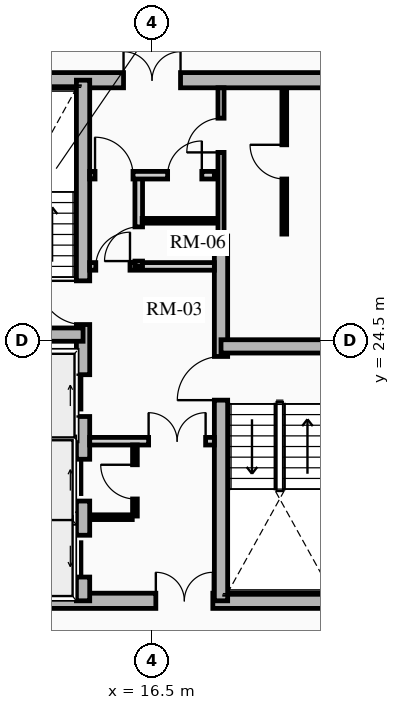
"""IFC4 building model, lengths in metres.
Left out: names, types, materials, properties, quantities, classifications, styles, units other than length and angle.
Written with IfcOpenShell. Run it as: python <this file> out.ifc"""

import sys

from ifc_helpers import new_model, si_unit, direction, frame, frame_2d, origin, place, context, subcontext, project, spatial, rectangle, extrude, source, transform, mapped, element, fill, save


model = new_model("IFC4")
c1 = context("Model", 3, precision=1e-05, world=origin(), true_north=direction((0.0, 1.0)))
c2 = subcontext(c1, "Body", "Model", "MODEL_VIEW")
j1 = project(units=[si_unit("LENGTHUNIT", "METRE"), si_unit("PLANEANGLEUNIT", "RADIAN")], contexts=[c1])
p1 = place(None, origin())
s1 = spatial("IfcSite", under=j1, at=p1, CompositionType="ELEMENT")
p2 = place(p1, origin())
s2 = spatial("IfcBuilding", under=s1, at=p2, CompositionType="ELEMENT")
p3 = place(p2, frame((0.0, 0.0, 151.6)))
s3 = spatial("IfcBuildingStorey", under=s2, at=p3, CompositionType="ELEMENT", Elevation=151.6)
p4 = place(p3, frame((11.15, 17.65, 0.0), z_axis=(0.0, 0.0, 1.0), x_axis=(1.0, 0.0, 0.0)))
e1 = element("IfcWall", 1, at=p4, inside=s3, PredefinedType="SHEAR", context=c2, shape_type="SweptSolid", body=[
    extrude(rectangle(XDim=10.7, YDim=0.4, at=frame_2d((5.35, 0.0))), origin(), (0.0, 0.0, 1.0), 2.91),
])
m1 = source(origin(), c2, "Body", "SweptSolid", [
    extrude(rectangle(XDim=1.5, YDim=2.02, at=frame_2d((0.75, 1.01))), frame((0.0, 0.21, 0.0), z_axis=(0.0, -1.0, 0.0), x_axis=(1.0, 0.0, 0.0)), (0.0, 0.0, 1.0), 0.42),
])
p5 = place(p4, frame((5.45, 0.0, 0.0)))
e2 = element("IfcOpeningElement", 2, at=p5, cuts=e1, PredefinedType="OPENING", context=c2, shape_type="MappedRepresentation", body=[
    mapped(m1, transform((0.0, 0.0, 0.0), x_axis=(1.0, 0.0, 0.0), y_axis=(0.0, 1.0, 0.0), z_axis=(0.0, 0.0, 1.0), scale=1.0)),
])
p6 = place(p3, frame((11.15, 31.35, 0.0), z_axis=(0.0, 0.0, 1.0), x_axis=(1.0, 0.0, 0.0)))
e3 = element("IfcWall", 3, at=p6, inside=s3, PredefinedType="SHEAR", context=c2, shape_type="SweptSolid", body=[
    extrude(rectangle(XDim=10.7, YDim=0.4, at=frame_2d((5.35, 0.0))), origin(), (0.0, 0.0, 1.0), 2.91),
])
p7 = place(p6, frame((4.6, 0.0, 0.0)))
e4 = element("IfcOpeningElement", 4, at=p7, cuts=e3, PredefinedType="OPENING", context=c2, shape_type="MappedRepresentation", body=[
    mapped(m1, transform((0.0, 0.0, 0.0), x_axis=(1.0, 0.0, 0.0), y_axis=(0.0, 1.0, 0.0), z_axis=(0.0, 0.0, 1.0), scale=1.0)),
])
p8 = place(p3, frame((14.685, 17.65, 0.0), z_axis=(0.0, 0.0, 1.0), x_axis=(0.0, 1.0, 0.0)))
e5 = element("IfcWall", 5, at=p8, inside=s3, PredefinedType="SHEAR", context=c2, shape_type="SweptSolid", body=[
    extrude(rectangle(XDim=13.7, YDim=0.35, at=frame_2d((6.85, 0.0))), origin(), (0.0, 0.0, 1.0), 2.91),
])
m2 = source(origin(), c2, "Body", "SweptSolid", [
    extrude(rectangle(XDim=1.1, YDim=2.015, at=frame_2d((0.55, 1.007))), frame((0.0, 0.185, 0.0), z_axis=(0.0, -1.0, 0.0), x_axis=(1.0, 0.0, 0.0)), (0.0, 0.0, 1.0), 0.37),
])
p9 = place(p8, frame((4.85, 0.0, 0.0)))
e6 = element("IfcOpeningElement", 6, at=p9, cuts=e5, PredefinedType="OPENING", context=c2, shape_type="MappedRepresentation", body=[
    mapped(m2, transform((0.0, 0.0, 0.0), x_axis=(1.0, 0.0, 0.0), y_axis=(0.0, 1.0, 0.0), z_axis=(0.0, 0.0, 1.0), scale=1.0)),
])
p10 = place(p8, frame((0.625, 0.0, 0.0)))
e7 = element("IfcOpeningElement", 7, at=p10, cuts=e5, PredefinedType="OPENING", context=c2, shape_type="MappedRepresentation", body=[
    mapped(m2, transform((0.0, 0.0, 0.0), x_axis=(1.0, 0.0, 0.0), y_axis=(0.0, 1.0, 0.0), z_axis=(0.0, 0.0, 1.0), scale=1.0)),
])
p11 = place(p8, frame((2.625, 0.0, 0.0)))
e8 = element("IfcOpeningElement", 8, at=p11, cuts=e5, PredefinedType="OPENING", context=c2, shape_type="MappedRepresentation", body=[
    mapped(m2, transform((0.0, 0.0, 0.0), x_axis=(1.0, 0.0, 0.0), y_axis=(0.0, 1.0, 0.0), z_axis=(0.0, 0.0, 1.0), scale=1.0)),
])
m3 = source(origin(), c2, "Body", "SweptSolid", [
    extrude(rectangle(XDim=1.15, YDim=2.02, at=frame_2d((0.575, 1.01))), frame((0.0, 0.185, 0.0), z_axis=(0.0, -1.0, 0.0), x_axis=(1.0, 0.0, 0.0)), (0.0, 0.0, 1.0), 0.37),
])
p12 = place(p8, frame((7.27, 0.0, 0.0)))
e9 = element("IfcOpeningElement", 9, at=p12, cuts=e5, PredefinedType="OPENING", context=c2, shape_type="MappedRepresentation", body=[
    mapped(m3, transform((0.0, 0.0, 0.0), x_axis=(1.0, 0.0, 0.0), y_axis=(0.0, 1.0, 0.0), z_axis=(0.0, 0.0, 1.0), scale=1.0)),
])
p13 = place(p3, frame((18.315, 17.65, 0.0), z_axis=(0.0, 0.0, 1.0), x_axis=(0.0, 1.0, 0.0)))
e10 = element("IfcWall", 10, at=p13, inside=s3, PredefinedType="SHEAR", context=c2, shape_type="SweptSolid", body=[
    extrude(rectangle(XDim=9.6, YDim=0.35, at=frame_2d((4.8, 0.0))), origin(), (0.0, 0.0, 1.0), 2.91),
])
p14 = place(p13, frame((5.28, 0.0, 0.0)))
e11 = element("IfcOpeningElement", 11, at=p14, cuts=e10, PredefinedType="OPENING", context=c2, shape_type="MappedRepresentation", body=[
    mapped(m3, transform((0.0, 0.0, 0.0), x_axis=(1.0, 0.0, 0.0), y_axis=(0.0, 1.0, 0.0), z_axis=(0.0, 0.0, 1.0), scale=1.0)),
])
for number, where, z_axis, x_axis in (
    (12, (11.4, 24.655, 0.0), (0.0, 0.0, 1.0), (1.0, 0.0, 0.0)),
    (13, (18.315, 24.345, 0.0), (0.0, 0.0, 1.0), (1.0, 0.0, 0.0)),
):
    element("IfcWall", number, at=place(p3, frame(where, z_axis=z_axis, x_axis=x_axis)), inside=s3, PredefinedType="SHEAR", context=c2, shape_type="SweptSolid", body=[
        extrude(rectangle(XDim=3.285, YDim=0.35, at=frame_2d((1.643, 0.0))), origin(), (0.0, 0.0, 1.0), 2.91),
    ])
for number, where, z_axis, x_axis in (
    (14, (11.52, 21.8, 0.0), (0.0, 0.0, 1.0), (1.0, 0.0, 0.0)),
    (15, (11.52, 19.825, 0.0), (0.0, 0.0, 1.0), (1.0, 0.0, 0.0)),
):
    element("IfcWall", number, at=place(p3, frame(where, z_axis=z_axis, x_axis=x_axis)), inside=s3, PredefinedType="SHEAR", context=c2, shape_type="SweptSolid", body=[
        extrude(rectangle(XDim=2.97, YDim=0.2, at=frame_2d((1.485, 0.0))), origin(), (0.0, 0.0, 1.0), 2.91),
    ])
p15 = place(p3, frame((14.86, 21.85, 0.0), z_axis=(0.0, 0.0, 1.0), x_axis=(1.0, 0.0, 0.0)))
e16 = element("IfcWall", 16, at=p15, inside=s3, PredefinedType="PARTITIONING", context=c2, shape_type="SweptSolid", body=[
    extrude(rectangle(XDim=3.28, YDim=0.2, at=frame_2d((1.64, 0.0))), origin(), (0.0, 0.0, 1.0), 2.675),
])
m4 = source(origin(), c2, "Body", "SweptSolid", [
    extrude(rectangle(XDim=1.5, YDim=2.02, at=frame_2d((0.75, 1.01))), frame((0.0, 0.11, 0.0), z_axis=(0.0, -1.0, 0.0), x_axis=(1.0, 0.0, 0.0)), (0.0, 0.0, 1.0), 0.22),
])
p16 = place(p15, frame((1.55, 0.0, 0.0)))
e17 = element("IfcOpeningElement", 17, at=p16, cuts=e16, PredefinedType="OPENING", context=c2, shape_type="MappedRepresentation", body=[
    mapped(m4, transform((0.0, 0.0, 0.0), x_axis=(1.0, 0.0, 0.0), y_axis=(0.0, 1.0, 0.0), z_axis=(0.0, 0.0, 1.0), scale=1.0)),
])
p17 = place(p3, frame((14.86, 26.45, 0.0), z_axis=(0.0, 0.0, 1.0), x_axis=(1.0, 0.0, 0.0)))
e18 = element("IfcWall", 18, at=p17, inside=s3, PredefinedType="PARTITIONING", context=c2, shape_type="SweptSolid", body=[
    extrude(rectangle(XDim=3.28, YDim=0.2, at=frame_2d((1.64, 0.0))), origin(), (0.0, 0.0, 1.0), 2.675),
])
m5 = source(origin(), c2, "Body", "SweptSolid", [
    extrude(rectangle(XDim=0.9, YDim=2.005, at=frame_2d((0.45, 1.002))), frame((0.0, 0.11, 0.0), z_axis=(0.0, -1.0, 0.0), x_axis=(1.0, 0.0, 0.0)), (0.0, 0.0, 1.0), 0.22),
])
p18 = place(p17, frame((0.16, 0.0, 0.0)))
e19 = element("IfcOpeningElement", 19, at=p18, cuts=e18, PredefinedType="OPENING", context=c2, shape_type="MappedRepresentation", body=[
    mapped(m5, transform((0.0, 0.0, 0.0), x_axis=(1.0, 0.0, 0.0), y_axis=(0.0, 1.0, 0.0), z_axis=(0.0, 0.0, 1.0), scale=1.0)),
])
p19 = place(p3, frame((16.15, 26.45, 0.0), z_axis=(0.0, 0.0, 1.0), x_axis=(0.0, 1.0, 0.0)))
e20 = element("IfcWall", 20, at=p19, inside=s3, PredefinedType="PARTITIONING", context=c2, shape_type="SweptSolid", body=[
    extrude(rectangle(XDim=2.4, YDim=0.2, at=frame_2d((1.2, 0.0))), origin(), (0.0, 0.0, 1.0), 2.675),
])
p20 = place(p19, frame((0.14, 0.0, 0.0)))
e21 = element("IfcOpeningElement", 21, at=p20, cuts=e20, PredefinedType="OPENING", context=c2, shape_type="MappedRepresentation", body=[
    mapped(m5, transform((0.0, 0.0, 0.0), x_axis=(1.0, 0.0, 0.0), y_axis=(0.0, 1.0, 0.0), z_axis=(0.0, 0.0, 1.0), scale=1.0)),
])
p21 = place(p3, frame((14.86, 28.85, 0.0), z_axis=(0.0, 0.0, 1.0), x_axis=(1.0, 0.0, 0.0)))
e22 = element("IfcWall", 22, at=p21, inside=s3, PredefinedType="PARTITIONING", context=c2, shape_type="SweptSolid", body=[
    extrude(rectangle(XDim=3.28, YDim=0.2, at=frame_2d((1.64, 0.0))), origin(), (0.0, 0.0, 1.0), 2.675),
])
m6 = source(origin(), c2, "Body", "SweptSolid", [
    extrude(rectangle(XDim=1.0, YDim=2.015, at=frame_2d((0.5, 1.007))), frame((0.0, 0.11, 0.0), z_axis=(0.0, -1.0, 0.0), x_axis=(1.0, 0.0, 0.0)), (0.0, 0.0, 1.0), 0.22),
])
p22 = place(p21, frame((0.14, 0.0, 0.0)))
e23 = element("IfcOpeningElement", 23, at=p22, cuts=e22, PredefinedType="OPENING", context=c2, shape_type="MappedRepresentation", body=[
    mapped(m6, transform((0.0, 0.0, 0.0), x_axis=(1.0, 0.0, 0.0), y_axis=(0.0, 1.0, 0.0), z_axis=(0.0, 0.0, 1.0), scale=1.0)),
])
p23 = place(p21, frame((2.05, 0.0, 0.0)))
e24 = element("IfcOpeningElement", 24, at=p23, cuts=e22, PredefinedType="OPENING", context=c2, shape_type="MappedRepresentation", body=[
    mapped(m5, transform((0.0, 0.0, 0.0), x_axis=(1.0, 0.0, 0.0), y_axis=(0.0, 1.0, 0.0), z_axis=(0.0, 0.0, 1.0), scale=1.0)),
])
p24 = place(p3, frame((16.05, 19.88, 0.0), z_axis=(0.0, 0.0, 1.0), x_axis=(0.0, 1.0, 0.0)))
e25 = element("IfcWall", 25, at=p24, inside=s3, PredefinedType="PARTITIONING", context=c2, shape_type="SweptSolid", body=[
    extrude(rectangle(XDim=1.87, YDim=0.125, at=frame_2d((0.935, 0.0))), origin(), (0.0, 0.0, 1.0), 2.675),
])
m7 = source(origin(), c2, "Body", "SweptSolid", [
    extrude(rectangle(XDim=0.9, YDim=2.005, at=frame_2d((0.45, 1.002))), frame((0.0, 0.073, 0.0), z_axis=(0.0, -1.0, 0.0), x_axis=(1.0, 0.0, 0.0)), (0.0, 0.0, 1.0), 0.145),
])
p25 = place(p24, frame((0.45, 0.0, 0.0)))
e26 = element("IfcOpeningElement", 26, at=p25, cuts=e25, PredefinedType="OPENING", context=c2, shape_type="MappedRepresentation", body=[
    mapped(m7, transform((0.0, 0.0, 0.0), x_axis=(1.0, 0.0, 0.0), y_axis=(0.0, 1.0, 0.0), z_axis=(0.0, 0.0, 1.0), scale=1.0)),
])
p26 = place(p3, frame((14.88, 19.85, 0.0), z_axis=(0.0, 0.0, 1.0), x_axis=(1.0, 0.0, 0.0)))
e27 = element("IfcWall", 27, at=p26, inside=s3, PredefinedType="PARTITIONING", context=c2, shape_type="SweptSolid", body=[
    extrude(rectangle(XDim=1.1, YDim=0.125, at=frame_2d((0.55, 0.0))), origin(), (0.0, 0.0, 1.0), 2.675),
])
p27 = place(p3, frame((16.24, 27.65, 0.0), z_axis=(0.0, 0.0, 1.0), x_axis=(1.0, 0.0, 0.0)))
e28 = element("IfcWall", 28, at=p27, inside=s3, PredefinedType="PARTITIONING", context=c2, shape_type="SweptSolid", body=[
    extrude(rectangle(XDim=1.88, YDim=0.125, at=frame_2d((0.94, 0.0))), origin(), (0.0, 0.0, 1.0), 2.675),
])
p28 = place(p3, frame((18.315, 27.25, 0.0), z_axis=(0.0, 0.0, 1.0), x_axis=(0.0, 1.0, 0.0)))
e29 = element("IfcWall", 29, at=p28, inside=s3, PredefinedType="PARTITIONING", context=c2, shape_type="SweptSolid", body=[
    extrude(rectangle(XDim=3.9, YDim=0.16, at=frame_2d((1.95, 0.0))), origin(), (0.0, 0.0, 1.0), 2.675),
])
m8 = source(origin(), c2, "Body", "SweptSolid", [
    extrude(rectangle(XDim=0.9, YDim=2.005, at=frame_2d((0.45, 1.002))), frame((0.0, 0.09, 0.0), z_axis=(0.0, -1.0, 0.0), x_axis=(1.0, 0.0, 0.0)), (0.0, 0.0, 1.0), 0.18),
])
p29 = place(p28, frame((2.2, 0.0, 0.0)))
e30 = element("IfcOpeningElement", 30, at=p29, cuts=e29, PredefinedType="OPENING", context=c2, shape_type="MappedRepresentation", body=[
    mapped(m8, transform((0.0, 0.0, 0.0), x_axis=(1.0, 0.0, 0.0), y_axis=(0.0, 1.0, 0.0), z_axis=(0.0, 0.0, 1.0), scale=1.0)),
])
p30 = place(p3, frame((19.98, 27.3, 0.0), z_axis=(0.0, 0.0, 1.0), x_axis=(0.0, 1.0, 0.0)))
e31 = element("IfcWall", 31, at=p30, inside=s3, PredefinedType="PARTITIONING", context=c2, shape_type="SweptSolid", body=[
    extrude(rectangle(XDim=3.82, YDim=0.125, at=frame_2d((1.91, 0.0))), origin(), (0.0, 0.0, 1.0), 2.675),
])
p31 = place(p30, frame((1.45, 0.0, 0.0)))
e32 = element("IfcOpeningElement", 32, at=p31, cuts=e31, PredefinedType="OPENING", context=c2, shape_type="MappedRepresentation", body=[
    mapped(m7, transform((0.0, 0.0, 0.0), x_axis=(1.0, 0.0, 0.0), y_axis=(0.0, 1.0, 0.0), z_axis=(0.0, 0.0, 1.0), scale=1.0)),
])
m9 = source(origin(), c2, "Body", "SweptSolid", [
    extrude(rectangle(XDim=1.1, YDim=2.015, at=frame_2d((0.55, 1.007))), frame((0.0, 0.025, 0.0), z_axis=(0.0, -1.0, 0.0), x_axis=(1.0, 0.0, 0.0)), (0.0, 0.0, 1.0), 0.05),
])
p32 = place(p9, origin())
e33 = element("IfcDoor", 33, at=p32, inside=s3, OperationType="SLIDING_TO_RIGHT", PredefinedType="DOOR", context=c2, shape_type="MappedRepresentation", body=[
    mapped(m9, transform((0.0, 0.0, 0.0), x_axis=(1.0, 0.0, 0.0), y_axis=(0.0, 1.0, 0.0), z_axis=(0.0, 0.0, 1.0), scale=1.0)),
])
fill(e6, e33)
p33 = place(p10, origin())
e34 = element("IfcDoor", 34, at=p33, inside=s3, OperationType="SLIDING_TO_LEFT", PredefinedType="DOOR", context=c2, shape_type="MappedRepresentation", body=[
    mapped(m9, transform((0.0, 0.0, 0.0), x_axis=(1.0, 0.0, 0.0), y_axis=(0.0, 1.0, 0.0), z_axis=(0.0, 0.0, 1.0), scale=1.0)),
])
fill(e7, e34)
p34 = place(p11, origin())
e35 = element("IfcDoor", 35, at=p34, inside=s3, OperationType="SLIDING_TO_RIGHT", PredefinedType="DOOR", context=c2, shape_type="MappedRepresentation", body=[
    mapped(m9, transform((0.0, 0.0, 0.0), x_axis=(1.0, 0.0, 0.0), y_axis=(0.0, 1.0, 0.0), z_axis=(0.0, 0.0, 1.0), scale=1.0)),
])
fill(e8, e35)
m10 = source(origin(), c2, "Body", "SweptSolid", [
    extrude(rectangle(XDim=1.15, YDim=2.02, at=frame_2d((0.575, 1.01))), frame((0.0, 0.025, 0.0), z_axis=(0.0, -1.0, 0.0), x_axis=(1.0, 0.0, 0.0)), (0.0, 0.0, 1.0), 0.05),
])
p35 = place(p12, origin())
e36 = element("IfcDoor", 36, at=p35, inside=s3, OperationType="SINGLE_SWING_RIGHT", PredefinedType="DOOR", context=c2, shape_type="MappedRepresentation", body=[
    mapped(m10, transform((0.0, 0.0, 0.0), x_axis=(1.0, 0.0, 0.0), y_axis=(0.0, 1.0, 0.0), z_axis=(0.0, 0.0, 1.0), scale=1.0)),
])
fill(e9, e36)
p36 = place(p14, origin())
e37 = element("IfcDoor", 37, at=p36, inside=s3, OperationType="SINGLE_SWING_LEFT", PredefinedType="DOOR", context=c2, shape_type="MappedRepresentation", body=[
    mapped(m10, transform((0.0, 0.0, 0.0), x_axis=(1.0, 0.0, 0.0), y_axis=(0.0, 1.0, 0.0), z_axis=(0.0, 0.0, 1.0), scale=1.0)),
])
fill(e11, e37)
m11 = source(origin(), c2, "Body", "SweptSolid", [
    extrude(rectangle(XDim=1.5, YDim=2.02, at=frame_2d((0.75, 1.01))), frame((0.0, 0.025, 0.0), z_axis=(0.0, -1.0, 0.0), x_axis=(1.0, 0.0, 0.0)), (0.0, 0.0, 1.0), 0.05),
])
p37 = place(p7, origin())
e38 = element("IfcDoor", 38, at=p37, inside=s3, OperationType="DOUBLE_DOOR_SINGLE_SWING", PredefinedType="DOOR", context=c2, shape_type="MappedRepresentation", body=[
    mapped(m11, transform((0.0, 0.0, 0.0), x_axis=(1.0, 0.0, 0.0), y_axis=(0.0, 1.0, 0.0), z_axis=(0.0, 0.0, 1.0), scale=1.0)),
])
fill(e4, e38)
p38 = place(p5, origin())
e39 = element("IfcDoor", 39, at=p38, inside=s3, OperationType="DOUBLE_DOOR_SINGLE_SWING", PredefinedType="DOOR", context=c2, shape_type="MappedRepresentation", body=[
    mapped(m11, transform((0.0, 0.0, 0.0), x_axis=(1.0, 0.0, 0.0), y_axis=(0.0, 1.0, 0.0), z_axis=(0.0, 0.0, 1.0), scale=1.0)),
])
fill(e2, e39)
p39 = place(p16, origin())
e40 = element("IfcDoor", 40, at=p39, inside=s3, OperationType="DOUBLE_DOOR_SINGLE_SWING", PredefinedType="DOOR", context=c2, shape_type="MappedRepresentation", body=[
    mapped(m11, transform((0.0, 0.0, 0.0), x_axis=(1.0, 0.0, 0.0), y_axis=(0.0, 1.0, 0.0), z_axis=(0.0, 0.0, 1.0), scale=1.0)),
])
fill(e17, e40)
m12 = source(origin(), c2, "Body", "SweptSolid", [
    extrude(rectangle(XDim=0.9, YDim=2.005, at=frame_2d((0.45, 1.002))), frame((0.0, 0.025, 0.0), z_axis=(0.0, -1.0, 0.0), x_axis=(1.0, 0.0, 0.0)), (0.0, 0.0, 1.0), 0.05),
])
p40 = place(p18, origin())
e41 = element("IfcDoor", 41, at=p40, inside=s3, OperationType="SINGLE_SWING_RIGHT", PredefinedType="DOOR", context=c2, shape_type="MappedRepresentation", body=[
    mapped(m12, transform((0.0, 0.0, 0.0), x_axis=(1.0, 0.0, 0.0), y_axis=(0.0, 1.0, 0.0), z_axis=(0.0, 0.0, 1.0), scale=1.0)),
])
fill(e19, e41)
m13 = source(origin(), c2, "Body", "SweptSolid", [
    extrude(rectangle(XDim=1.0, YDim=2.015, at=frame_2d((0.5, 1.007))), frame((0.0, 0.025, 0.0), z_axis=(0.0, -1.0, 0.0), x_axis=(1.0, 0.0, 0.0)), (0.0, 0.0, 1.0), 0.05),
])
p41 = place(p22, origin())
e42 = element("IfcDoor", 42, at=p41, inside=s3, OperationType="SINGLE_SWING_LEFT", PredefinedType="DOOR", context=c2, shape_type="MappedRepresentation", body=[
    mapped(m13, transform((0.0, 0.0, 0.0), x_axis=(1.0, 0.0, 0.0), y_axis=(0.0, 1.0, 0.0), z_axis=(0.0, 0.0, 1.0), scale=1.0)),
])
fill(e23, e42)
p42 = place(p25, origin())
e43 = element("IfcDoor", 43, at=p42, inside=s3, OperationType="SINGLE_SWING_RIGHT", PredefinedType="DOOR", context=c2, shape_type="MappedRepresentation", body=[
    mapped(m12, transform((0.0, 0.0, 0.0), x_axis=(1.0, 0.0, 0.0), y_axis=(0.0, 1.0, 0.0), z_axis=(0.0, 0.0, 1.0), scale=1.0)),
])
fill(e26, e43)
p43 = place(p20, origin())
e44 = element("IfcDoor", 44, at=p43, inside=s3, OperationType="SINGLE_SWING_LEFT", PredefinedType="DOOR", context=c2, shape_type="MappedRepresentation", body=[
    mapped(m12, transform((0.0, 0.0, 0.0), x_axis=(1.0, 0.0, 0.0), y_axis=(0.0, 1.0, 0.0), z_axis=(0.0, 0.0, 1.0), scale=1.0)),
])
fill(e21, e44)
p44 = place(p23, origin())
e45 = element("IfcDoor", 45, at=p44, inside=s3, OperationType="SINGLE_SWING_RIGHT", PredefinedType="DOOR", context=c2, shape_type="MappedRepresentation", body=[
    mapped(m12, transform((0.0, 0.0, 0.0), x_axis=(1.0, 0.0, 0.0), y_axis=(0.0, 1.0, 0.0), z_axis=(0.0, 0.0, 1.0), scale=1.0)),
])
fill(e24, e45)
p45 = place(p29, origin())
e46 = element("IfcDoor", 46, at=p45, inside=s3, OperationType="SINGLE_SWING_LEFT", PredefinedType="DOOR", context=c2, shape_type="MappedRepresentation", body=[
    mapped(m12, transform((0.0, 0.0, 0.0), x_axis=(1.0, 0.0, 0.0), y_axis=(0.0, 1.0, 0.0), z_axis=(0.0, 0.0, 1.0), scale=1.0)),
])
fill(e30, e46)
p46 = place(p31, origin())
e47 = element("IfcDoor", 47, at=p46, inside=s3, OperationType="SINGLE_SWING_RIGHT", PredefinedType="DOOR", context=c2, shape_type="MappedRepresentation", body=[
    mapped(m12, transform((0.0, 0.0, 0.0), x_axis=(1.0, 0.0, 0.0), y_axis=(0.0, 1.0, 0.0), z_axis=(0.0, 0.0, 1.0), scale=1.0)),
])
fill(e32, e47)
save(model, sys.argv[1])
